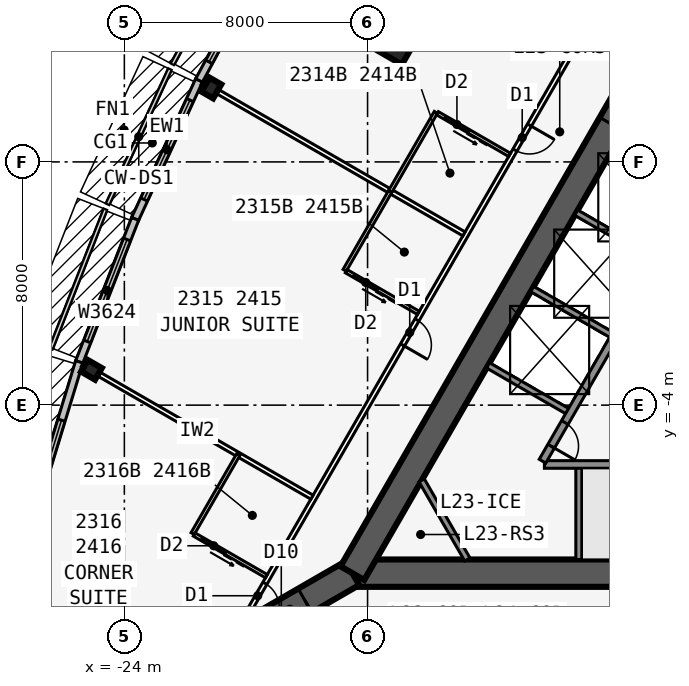
"""IFC4 building model, lengths in metres.
Left out: names, types, materials, properties, quantities, classifications, styles, units other than length and angle.
Written with IfcOpenShell. Run it as: python <this file> out.ifc"""

import sys

from ifc_helpers import new_model, si_unit, direction, frame, frame_2d, origin, origin_2d, place, context, subcontext, project, spatial, rectangle, i_section, extrude, element, fill, save


model = new_model("IFC4")
c1 = context("Model", 3, precision=1e-05, world=origin(), true_north=direction((0.0, 1.0)))
c2 = subcontext(c1, "Body", "Model", "MODEL_VIEW")
j1 = project(units=[si_unit("LENGTHUNIT", "METRE"), si_unit("PLANEANGLEUNIT", "RADIAN")], contexts=[c1])
p1 = place(None, origin())
s1 = spatial("IfcSite", under=j1, at=p1, CompositionType="ELEMENT")
p2 = place(p1, origin())
s2 = spatial("IfcBuilding", under=s1, at=p2, CompositionType="ELEMENT")
p3 = place(p2, frame((0.0, 0.0, 89.7)))
s3 = spatial("IfcBuildingStorey", under=s2, at=p3, CompositionType="ELEMENT", Elevation=89.7)
p4 = place(p3, frame((-16.5, -9.526, 0.0), z_axis=(0.0, 0.0, 1.0), x_axis=(1.0, 0.0, 0.0)))
e1 = element("IfcWall", 1, at=p4, inside=s3, PredefinedType="SHEAR", context=c2, shape_type="SweptSolid", body=[
    extrude(rectangle(XDim=33.0, YDim=0.9, at=frame_2d((16.5, 0.0))), origin(), (0.0, 0.0, 1.0), 3.4),
])
p5 = place(p4, frame((14.05, 0.0, 0.0)))
e2 = element("IfcOpeningElement", 2, at=p5, cuts=e1, PredefinedType="OPENING", context=c2, shape_type="SweptSolid", body=[
    extrude(rectangle(XDim=1.8, YDim=2.13, at=frame_2d((0.9, 1.065))), frame((0.0, 0.46, 0.0), z_axis=(0.0, -1.0, 0.0), x_axis=(1.0, 0.0, 0.0)), (0.0, 0.0, 1.0), 0.92),
])
p6 = place(p3, frame((-10.183, -5.951, 0.0), z_axis=(0.0, 0.0, 1.0), x_axis=(1.0, 0.0, 0.0)))
e3 = element("IfcWall", 3, at=p6, inside=s3, PredefinedType="SOLIDWALL", context=c2, shape_type="SweptSolid", body=[
    extrude(rectangle(XDim=7.633, YDim=0.25, at=frame_2d((3.816, 0.0))), origin(), (0.0, 0.0, 1.0), 3.235),
])
p7 = place(p3, frame((-9.05, -5.951, 0.0), z_axis=(0.0, 0.0, 1.0), x_axis=(0.0, -1.0, 0.0)))
e4 = element("IfcWall", 4, at=p7, inside=s3, PredefinedType="SOLIDWALL", context=c2, shape_type="SweptSolid", body=[
    extrude(rectangle(XDim=3.125, YDim=0.2, at=frame_2d((1.562, 0.0))), origin(), (0.0, 0.0, 1.0), 3.235),
])
p8 = place(p3, frame((0.0, 19.052, 0.0), z_axis=(0.0, 0.0, 1.0), x_axis=(-0.499999749417, -0.866025548458, 0.0)))
e5 = element("IfcWall", 5, at=p8, inside=s3, PredefinedType="SHEAR", context=c2, shape_type="SweptSolid", body=[
    extrude(rectangle(XDim=33.0, YDim=0.9, at=frame_2d((16.5, 0.0))), origin(), (0.0, 0.0, 1.0), 3.4),
])
p9 = place(p8, frame((14.15, 0.0, 0.0)))
e6 = element("IfcOpeningElement", 6, at=p9, cuts=e5, PredefinedType="OPENING", context=c2, shape_type="SweptSolid", body=[
    extrude(rectangle(XDim=1.8, YDim=2.13, at=frame_2d((0.9, 1.065))), frame((0.0, 0.46, 0.0), z_axis=(0.0, -1.0, 0.0), x_axis=(1.0, 0.0, 0.0)), (0.0, 0.0, 1.0), 0.92),
])
p10 = place(p8, frame((12.6, 0.0, 0.0)))
e7 = element("IfcOpeningElement", 7, at=p10, cuts=e5, PredefinedType="OPENING", context=c2, shape_type="SweptSolid", body=[
    extrude(rectangle(XDim=1.0, YDim=2.13, at=frame_2d((0.5, 1.065))), frame((0.0, 0.46, 0.0), z_axis=(0.0, -1.0, 0.0), x_axis=(1.0, 0.0, 0.0)), (0.0, 0.0, 1.0), 0.92),
])
p11 = place(p3, frame((-4.929, 3.365, 0.0), z_axis=(0.0, 0.0, 1.0), x_axis=(-0.499991433582, -0.866030349552, 0.0)))
e8 = element("IfcWall", 8, at=p11, inside=s3, PredefinedType="SOLIDWALL", context=c2, shape_type="SweptSolid", body=[
    extrude(rectangle(XDim=10.633, YDim=0.25, at=frame_2d((5.316, 0.0))), origin(), (0.0, 0.0, 1.0), 3.235),
])
p12 = place(p11, frame((9.164, 0.0, 0.0)))
e9 = element("IfcOpeningElement", 9, at=p12, cuts=e8, PredefinedType="OPENING", context=c2, shape_type="SweptSolid", body=[
    extrude(rectangle(XDim=0.9, YDim=2.13, at=frame_2d((0.45, 1.065))), frame((0.0, 0.135, 0.0), z_axis=(0.0, -1.0, 0.0), x_axis=(1.0, 0.0, 0.0)), (0.0, 0.0, 1.0), 0.27),
])
for number, where, z_axis, x_axis in (
    (10, (-6.429, 0.767, 0.0), (0.0, 0.0, 1.0), (-0.866, 0.5, 0.0)),
    (11, (-7.879, -1.744, 0.0), (0.0, 0.0, 1.0), (-0.866, 0.5, 0.0)),
    (12, (-9.329, -4.256, 0.0), (0.0, 0.0, 1.0), (-0.866, 0.5, 0.0)),
):
    element("IfcWall", number, at=place(p3, frame(where, z_axis=z_axis, x_axis=x_axis)), inside=s3, PredefinedType="SOLIDWALL", context=c2, shape_type="SweptSolid", body=[
        extrude(rectangle(XDim=3.125, YDim=0.2, at=frame_2d((1.562, 0.0))), origin(), (0.0, 0.0, 1.0), 3.235),
    ])
p13 = place(p3, frame((-16.5, -9.526, 0.0), z_axis=(0.0, 0.0, 1.0), x_axis=(-0.866031398331, -0.499989616998, 0.0)))
e13 = element("IfcWall", 13, at=p13, inside=s3, PredefinedType="SHEAR", context=c2, shape_type="SweptSolid", body=[
    extrude(rectangle(XDim=4.746, YDim=0.9, at=frame_2d((2.373, 0.0))), origin(), (0.0, 0.0, 1.0), 3.4),
])
p14 = place(p13, frame((1.8, 0.0, 0.0)))
e14 = element("IfcOpeningElement", 14, at=p14, cuts=e13, PredefinedType="OPENING", context=c2, shape_type="SweptSolid", body=[
    extrude(rectangle(XDim=1.8, YDim=2.13, at=frame_2d((0.9, 1.065))), frame((0.0, 0.46, 0.0), z_axis=(0.0, -1.0, 0.0), x_axis=(1.0, 0.0, 0.0)), (0.0, 0.0, 1.0), 0.92),
])
for number, where, z_axis, x_axis in (
    (15, (-21.137, 6.43, 0.0), (0.0, 0.0, 1.0), (-0.866, 0.5, 0.0)),
    (16, (-25.083, -2.839, 0.0), (0.0, 0.0, 1.0), (-0.5, -0.866, 0.0)),
):
    element("IfcColumn", number, at=place(p3, frame(where, z_axis=z_axis, x_axis=x_axis)), inside=s3, PredefinedType="COLUMN", context=c2, shape_type="SweptSolid", body=[
        extrude(i_section(OverallWidth=0.442, OverallDepth=0.531, WebThickness=0.066, FlangeThickness=0.106, at=origin_2d()), origin(), (0.0, 0.0, 1.0), 3.4),
    ])
p15 = place(p3, frame((-15.312, 8.84, 0.0), z_axis=(0.0, 0.0, 1.0), x_axis=(-0.866025403784, 0.5, 0.0)))
e17 = element("IfcColumn", 17, at=p15, inside=s3, PredefinedType="COLUMN", context=c2, shape_type="SweptSolid", body=[
    extrude(rectangle(XDim=2.4, YDim=2.4, at=origin_2d()), origin(), (0.0, 0.0, 1.0), 3.4),
])
p16 = place(p3, frame((-19.178, 11.077, 0.0), z_axis=(0.0, 0.0, 1.0), x_axis=(-0.473412820489, -0.880840678782, 0.0)))
e18 = element("IfcWall", 18, at=p16, inside=s3, PredefinedType="STANDARD", context=c2, shape_type="SweptSolid", body=[
    extrude(rectangle(XDim=5.002, YDim=0.25, at=frame_2d((2.501, 0.0))), origin(), (0.0, 0.0, 1.0), 3.235),
])
p17 = place(p16, frame((0.701, 0.0, 0.45)))
e19 = element("IfcOpeningElement", 19, at=p17, cuts=e18, PredefinedType="OPENING", context=c2, shape_type="SweptSolid", body=[
    extrude(rectangle(XDim=3.6, YDim=2.4, at=frame_2d((1.8, 1.2))), frame((0.0, 0.135, 0.0), z_axis=(0.0, -1.0, 0.0), x_axis=(1.0, 0.0, 0.0)), (0.0, 0.0, 1.0), 0.27),
])
p18 = place(p3, frame((-21.543, 6.678, 0.0), z_axis=(0.0, 0.0, 1.0), x_axis=(-0.419203100754, -0.907892482796, 0.0)))
e20 = element("IfcWall", 20, at=p18, inside=s3, PredefinedType="STANDARD", context=c2, shape_type="SweptSolid", body=[
    extrude(rectangle(XDim=5.021, YDim=0.25, at=frame_2d((2.51, 0.0))), origin(), (0.0, 0.0, 1.0), 3.235),
])
p19 = place(p18, frame((0.71, 0.0, 0.45)))
e21 = element("IfcOpeningElement", 21, at=p19, cuts=e20, PredefinedType="OPENING", context=c2, shape_type="SweptSolid", body=[
    extrude(rectangle(XDim=3.6, YDim=2.4, at=frame_2d((1.8, 1.2))), frame((0.0, 0.135, 0.0), z_axis=(0.0, -1.0, 0.0), x_axis=(1.0, 0.0, 0.0)), (0.0, 0.0, 1.0), 0.27),
])
p20 = place(p3, frame((-23.645, 2.126, 0.0), z_axis=(0.0, 0.0, 1.0), x_axis=(-0.364013463868, -0.931393685894, 0.0)))
e22 = element("IfcWall", 22, at=p20, inside=s3, PredefinedType="STANDARD", context=c2, shape_type="SweptSolid", body=[
    extrude(rectangle(XDim=5.058, YDim=0.25, at=frame_2d((2.529, 0.0))), origin(), (0.0, 0.0, 1.0), 3.235),
])
p21 = place(p20, frame((0.729, 0.0, 0.45)))
e23 = element("IfcOpeningElement", 23, at=p21, cuts=e22, PredefinedType="OPENING", context=c2, shape_type="SweptSolid", body=[
    extrude(rectangle(XDim=3.6, YDim=2.4, at=frame_2d((1.8, 1.2))), frame((0.0, 0.135, 0.0), z_axis=(0.0, -1.0, 0.0), x_axis=(1.0, 0.0, 0.0)), (0.0, 0.0, 1.0), 0.27),
])
p22 = place(p3, frame((-25.483, -2.575, 0.0), z_axis=(0.0, 0.0, 1.0), x_axis=(-0.2919790669, -0.956424709265, 0.0)))
e24 = element("IfcWall", 24, at=p22, inside=s3, PredefinedType="STANDARD", context=c2, shape_type="SweptSolid", body=[
    extrude(rectangle(XDim=8.211, YDim=0.25, at=frame_2d((4.105, 0.0))), origin(), (0.0, 0.0, 1.0), 3.235),
])
p23 = place(p22, frame((2.006, 0.0, 0.45)))
e25 = element("IfcOpeningElement", 25, at=p23, cuts=e24, PredefinedType="OPENING", context=c2, shape_type="SweptSolid", body=[
    extrude(rectangle(XDim=4.2, YDim=2.4, at=frame_2d((2.1, 1.2))), frame((0.0, 0.135, 0.0), z_axis=(0.0, -1.0, 0.0), x_axis=(1.0, 0.0, 0.0)), (0.0, 0.0, 1.0), 0.27),
])
p24 = place(p3, frame((-0.5, 22.836, 0.0), z_axis=(0.0, 0.0, 1.0), x_axis=(-0.500001677587, -0.866024435227, 0.0)))
e26 = element("IfcWall", 26, at=p24, inside=s3, PredefinedType="PARTITIONING", context=c2, shape_type="SweptSolid", body=[
    extrude(rectangle(XDim=39.054, YDim=0.15, at=frame_2d((19.527, 0.0))), origin(), (0.0, 0.0, 1.0), 3.235),
])
p25 = place(p24, frame((0.352, 0.0, 0.0)))
e27 = element("IfcOpeningElement", 27, at=p25, cuts=e26, PredefinedType="OPENING", context=c2, shape_type="SweptSolid", body=[
    extrude(rectangle(XDim=0.95, YDim=2.13, at=frame_2d((0.475, 1.065))), frame((0.0, 0.085, 0.0), z_axis=(0.0, -1.0, 0.0), x_axis=(1.0, 0.0, 0.0)), (0.0, 0.0, 1.0), 0.17),
])
p26 = place(p24, frame((6.552, 0.0, 0.0)))
e28 = element("IfcOpeningElement", 28, at=p26, cuts=e26, PredefinedType="OPENING", context=c2, shape_type="SweptSolid", body=[
    extrude(rectangle(XDim=0.95, YDim=2.13, at=frame_2d((0.475, 1.065))), frame((0.0, 0.085, 0.0), z_axis=(0.0, -1.0, 0.0), x_axis=(1.0, 0.0, 0.0)), (0.0, 0.0, 1.0), 0.17),
])
p27 = place(p24, frame((20.352, 0.0, 0.0)))
e29 = element("IfcOpeningElement", 29, at=p27, cuts=e26, PredefinedType="OPENING", context=c2, shape_type="SweptSolid", body=[
    extrude(rectangle(XDim=0.95, YDim=2.13, at=frame_2d((0.475, 1.065))), frame((0.0, 0.085, 0.0), z_axis=(0.0, -1.0, 0.0), x_axis=(1.0, 0.0, 0.0)), (0.0, 0.0, 1.0), 0.17),
])
p28 = place(p24, frame((27.752, 0.0, 0.0)))
e30 = element("IfcOpeningElement", 30, at=p28, cuts=e26, PredefinedType="OPENING", context=c2, shape_type="SweptSolid", body=[
    extrude(rectangle(XDim=0.95, YDim=2.13, at=frame_2d((0.475, 1.065))), frame((0.0, 0.085, 0.0), z_axis=(0.0, -1.0, 0.0), x_axis=(1.0, 0.0, 0.0)), (0.0, 0.0, 1.0), 0.17),
])
p29 = place(p24, frame((37.752, 0.0, 0.0)))
e31 = element("IfcOpeningElement", 31, at=p29, cuts=e26, PredefinedType="OPENING", context=c2, shape_type="SweptSolid", body=[
    extrude(rectangle(XDim=0.95, YDim=2.13, at=frame_2d((0.475, 1.065))), frame((0.0, 0.085, 0.0), z_axis=(0.0, -1.0, 0.0), x_axis=(1.0, 0.0, 0.0)), (0.0, 0.0, 1.0), 0.17),
])
p30 = place(p3, frame((-12.829, 1.633, 0.0), z_axis=(0.0, 0.0, 1.0), x_axis=(-0.866026934769, 0.499997348248, 0.0)))
e32 = element("IfcWall", 32, at=p30, inside=s3, PredefinedType="PARTITIONING", context=c2, shape_type="SweptSolid", body=[
    extrude(rectangle(XDim=9.943, YDim=0.15, at=frame_2d((4.971, 0.0))), origin(), (0.0, 0.0, 1.0), 2.389),
])
p31 = place(p3, frame((-17.829, -7.027, 0.0), z_axis=(0.0, 0.0, 1.0), x_axis=(-0.866032659912, 0.499987431809, 0.0)))
e33 = element("IfcWall", 33, at=p31, inside=s3, PredefinedType="PARTITIONING", context=c2, shape_type="SweptSolid", body=[
    extrude(rectangle(XDim=8.72, YDim=0.15, at=frame_2d((4.36, 0.0))), origin(), (0.0, 0.0, 1.0), 2.389),
])
p32 = place(p3, frame((-13.753, 5.631, 0.0), z_axis=(0.0, 0.0, 1.0), x_axis=(-0.499990139034, -0.866031096941, 0.0)))
e34 = element("IfcWall", 34, at=p32, inside=s3, PredefinedType="PLUMBINGWALL", context=c2, shape_type="SweptSolid", body=[
    extrude(rectangle(XDim=3.0, YDim=0.12, at=frame_2d((1.5, 0.0))), origin(), (0.0, 0.0, 1.0), 3.235),
])
p33 = place(p3, frame((-11.329, 4.231, 0.0), z_axis=(0.0, 0.0, 1.0), x_axis=(-0.866035715982, 0.499982138324, 0.0)))
e35 = element("IfcWall", 35, at=p33, inside=s3, PredefinedType="PLUMBINGWALL", context=c2, shape_type="SweptSolid", body=[
    extrude(rectangle(XDim=2.74, YDim=0.12, at=frame_2d((1.37, 0.0))), origin(), (0.0, 0.0, 1.0), 3.235),
])
p34 = place(p33, frame((1.55, 0.0, 0.0)))
e36 = element("IfcOpeningElement", 36, at=p34, cuts=e35, PredefinedType="OPENING", context=c2, shape_type="SweptSolid", body=[
    extrude(rectangle(XDim=0.9, YDim=2.13, at=frame_2d((0.45, 1.065))), frame((0.0, 0.07, 0.0), z_axis=(0.0, -1.0, 0.0), x_axis=(1.0, 0.0, 0.0)), (0.0, 0.0, 1.0), 0.14),
])
p35 = place(p3, frame((-15.253, 3.033, 0.0), z_axis=(0.0, 0.0, 1.0), x_axis=(-0.499990139034, -0.866031096941, 0.0)))
e37 = element("IfcWall", 37, at=p35, inside=s3, PredefinedType="PLUMBINGWALL", context=c2, shape_type="SweptSolid", body=[
    extrude(rectangle(XDim=3.0, YDim=0.12, at=frame_2d((1.5, 0.0))), origin(), (0.0, 0.0, 1.0), 3.235),
])
p36 = place(p3, frame((-14.329, -0.965, 0.0), z_axis=(0.0, 0.0, 1.0), x_axis=(-0.866035715982, 0.499982138324, 0.0)))
e38 = element("IfcWall", 38, at=p36, inside=s3, PredefinedType="PLUMBINGWALL", context=c2, shape_type="SweptSolid", body=[
    extrude(rectangle(XDim=2.74, YDim=0.12, at=frame_2d((1.37, 0.0))), origin(), (0.0, 0.0, 1.0), 3.235),
])
p37 = place(p36, frame((1.55, 0.0, 0.0)))
e39 = element("IfcOpeningElement", 39, at=p37, cuts=e38, PredefinedType="OPENING", context=c2, shape_type="SweptSolid", body=[
    extrude(rectangle(XDim=0.9, YDim=2.13, at=frame_2d((0.45, 1.065))), frame((0.0, 0.07, 0.0), z_axis=(0.0, -1.0, 0.0), x_axis=(1.0, 0.0, 0.0)), (0.0, 0.0, 1.0), 0.14),
])
p38 = place(p3, frame((-20.253, -5.627, 0.0), z_axis=(0.0, 0.0, 1.0), x_axis=(-0.499990139034, -0.866031096941, 0.0)))
e40 = element("IfcWall", 40, at=p38, inside=s3, PredefinedType="PLUMBINGWALL", context=c2, shape_type="SweptSolid", body=[
    extrude(rectangle(XDim=3.0, YDim=0.12, at=frame_2d((1.5, 0.0))), origin(), (0.0, 0.0, 1.0), 3.235),
])
p39 = place(p3, frame((-19.329, -9.625, 0.0), z_axis=(0.0, 0.0, 1.0), x_axis=(-0.866035715982, 0.499982138324, 0.0)))
e41 = element("IfcWall", 41, at=p39, inside=s3, PredefinedType="PLUMBINGWALL", context=c2, shape_type="SweptSolid", body=[
    extrude(rectangle(XDim=2.74, YDim=0.12, at=frame_2d((1.37, 0.0))), origin(), (0.0, 0.0, 1.0), 3.235),
])
p40 = place(p39, frame((1.55, 0.0, 0.0)))
e42 = element("IfcOpeningElement", 42, at=p40, cuts=e41, PredefinedType="OPENING", context=c2, shape_type="SweptSolid", body=[
    extrude(rectangle(XDim=0.9, YDim=2.13, at=frame_2d((0.45, 1.065))), frame((0.0, 0.07, 0.0), z_axis=(0.0, -1.0, 0.0), x_axis=(1.0, 0.0, 0.0)), (0.0, 0.0, 1.0), 0.14),
])
p41 = place(p3, frame((-12.719, -9.076, 0.0), z_axis=(0.0, 0.0, 1.0), x_axis=(-0.499952404951, 0.866052881055, 0.0)))
e43 = element("IfcWall", 43, at=p41, inside=s3, PredefinedType="SOLIDWALL", context=c2, shape_type="SweptSolid", body=[
    extrude(rectangle(XDim=3.002, YDim=0.2, at=frame_2d((1.501, 0.0))), origin(), (0.0, 0.0, 1.0), 3.235),
])
p42 = place(p17, origin())
e44 = element("IfcWindow", 44, at=p42, inside=s3, PartitioningType="SINGLE_PANEL", PredefinedType="WINDOW", context=c2, shape_type="SweptSolid", body=[
    extrude(rectangle(XDim=3.6, YDim=2.4, at=frame_2d((1.8, 1.2))), frame((0.0, 0.03, 0.0), z_axis=(0.0, -1.0, 0.0), x_axis=(1.0, 0.0, 0.0)), (0.0, 0.0, 1.0), 0.06),
])
fill(e19, e44)
p43 = place(p19, origin())
e45 = element("IfcWindow", 45, at=p43, inside=s3, PartitioningType="SINGLE_PANEL", PredefinedType="WINDOW", context=c2, shape_type="SweptSolid", body=[
    extrude(rectangle(XDim=3.6, YDim=2.4, at=frame_2d((1.8, 1.2))), frame((0.0, 0.03, 0.0), z_axis=(0.0, -1.0, 0.0), x_axis=(1.0, 0.0, 0.0)), (0.0, 0.0, 1.0), 0.06),
])
fill(e21, e45)
p44 = place(p21, origin())
e46 = element("IfcWindow", 46, at=p44, inside=s3, PartitioningType="SINGLE_PANEL", PredefinedType="WINDOW", context=c2, shape_type="SweptSolid", body=[
    extrude(rectangle(XDim=3.6, YDim=2.4, at=frame_2d((1.8, 1.2))), frame((0.0, 0.03, 0.0), z_axis=(0.0, -1.0, 0.0), x_axis=(1.0, 0.0, 0.0)), (0.0, 0.0, 1.0), 0.06),
])
fill(e23, e46)
p45 = place(p23, origin())
e47 = element("IfcWindow", 47, at=p45, inside=s3, PartitioningType="SINGLE_PANEL", PredefinedType="WINDOW", context=c2, shape_type="SweptSolid", body=[
    extrude(rectangle(XDim=4.2, YDim=2.4, at=frame_2d((2.1, 1.2))), frame((0.0, 0.03, 0.0), z_axis=(0.0, -1.0, 0.0), x_axis=(1.0, 0.0, 0.0)), (0.0, 0.0, 1.0), 0.06),
])
fill(e25, e47)
p46 = place(p34, origin())
e48 = element("IfcDoor", 48, at=p46, inside=s3, OperationType="SLIDING_TO_LEFT", PredefinedType="DOOR", context=c2, shape_type="SweptSolid", body=[
    extrude(rectangle(XDim=0.9, YDim=2.13, at=frame_2d((0.45, 1.065))), frame((0.0, 0.025, 0.0), z_axis=(0.0, -1.0, 0.0), x_axis=(1.0, 0.0, 0.0)), (0.0, 0.0, 1.0), 0.05),
])
fill(e36, e48)
p47 = place(p27, origin())
e49 = element("IfcDoor", 49, at=p47, inside=s3, OperationType="SINGLE_SWING_LEFT", PredefinedType="DOOR", context=c2, shape_type="SweptSolid", body=[
    extrude(rectangle(XDim=0.95, YDim=2.13, at=frame_2d((0.475, 1.065))), frame((0.0, 0.025, 0.0), z_axis=(0.0, -1.0, 0.0), x_axis=(1.0, 0.0, 0.0)), (0.0, 0.0, 1.0), 0.05),
])
fill(e29, e49)
p48 = place(p37, origin())
e50 = element("IfcDoor", 50, at=p48, inside=s3, OperationType="SLIDING_TO_LEFT", PredefinedType="DOOR", context=c2, shape_type="SweptSolid", body=[
    extrude(rectangle(XDim=0.9, YDim=2.13, at=frame_2d((0.45, 1.065))), frame((0.0, 0.025, 0.0), z_axis=(0.0, -1.0, 0.0), x_axis=(1.0, 0.0, 0.0)), (0.0, 0.0, 1.0), 0.05),
])
fill(e39, e50)
p49 = place(p28, origin())
e51 = element("IfcDoor", 51, at=p49, inside=s3, OperationType="SINGLE_SWING_RIGHT", PredefinedType="DOOR", context=c2, shape_type="SweptSolid", body=[
    extrude(rectangle(XDim=0.95, YDim=2.13, at=frame_2d((0.475, 1.065))), frame((0.0, 0.025, 0.0), z_axis=(0.0, -1.0, 0.0), x_axis=(1.0, 0.0, 0.0)), (0.0, 0.0, 1.0), 0.05),
])
fill(e30, e51)
p50 = place(p40, origin())
e52 = element("IfcDoor", 52, at=p50, inside=s3, OperationType="SLIDING_TO_LEFT", PredefinedType="DOOR", context=c2, shape_type="SweptSolid", body=[
    extrude(rectangle(XDim=0.9, YDim=2.13, at=frame_2d((0.45, 1.065))), frame((0.0, 0.025, 0.0), z_axis=(0.0, -1.0, 0.0), x_axis=(1.0, 0.0, 0.0)), (0.0, 0.0, 1.0), 0.05),
])
fill(e42, e52)
p51 = place(p29, origin())
e53 = element("IfcDoor", 53, at=p51, inside=s3, OperationType="SINGLE_SWING_RIGHT", PredefinedType="DOOR", context=c2, shape_type="SweptSolid", body=[
    extrude(rectangle(XDim=0.95, YDim=2.13, at=frame_2d((0.475, 1.065))), frame((0.0, 0.025, 0.0), z_axis=(0.0, -1.0, 0.0), x_axis=(1.0, 0.0, 0.0)), (0.0, 0.0, 1.0), 0.05),
])
fill(e31, e53)
p52 = place(p14, origin())
e54 = element("IfcDoor", 54, at=p52, inside=s3, OperationType="DOUBLE_DOOR_DOUBLE_SWING", PredefinedType="DOOR", context=c2, shape_type="SweptSolid", body=[
    extrude(rectangle(XDim=1.8, YDim=2.13, at=frame_2d((0.9, 1.065))), frame((0.0, 0.025, 0.0), z_axis=(0.0, -1.0, 0.0), x_axis=(1.0, 0.0, 0.0)), (0.0, 0.0, 1.0), 0.05),
])
fill(e14, e54)
p53 = place(p12, origin())
e55 = element("IfcDoor", 55, at=p53, inside=s3, OperationType="SINGLE_SWING_RIGHT", PredefinedType="DOOR", context=c2, shape_type="SweptSolid", body=[
    extrude(rectangle(XDim=0.9, YDim=2.13, at=frame_2d((0.45, 1.065))), frame((0.0, 0.025, 0.0), z_axis=(0.0, -1.0, 0.0), x_axis=(1.0, 0.0, 0.0)), (0.0, 0.0, 1.0), 0.05),
])
fill(e9, e55)
save(model, sys.argv[1])
